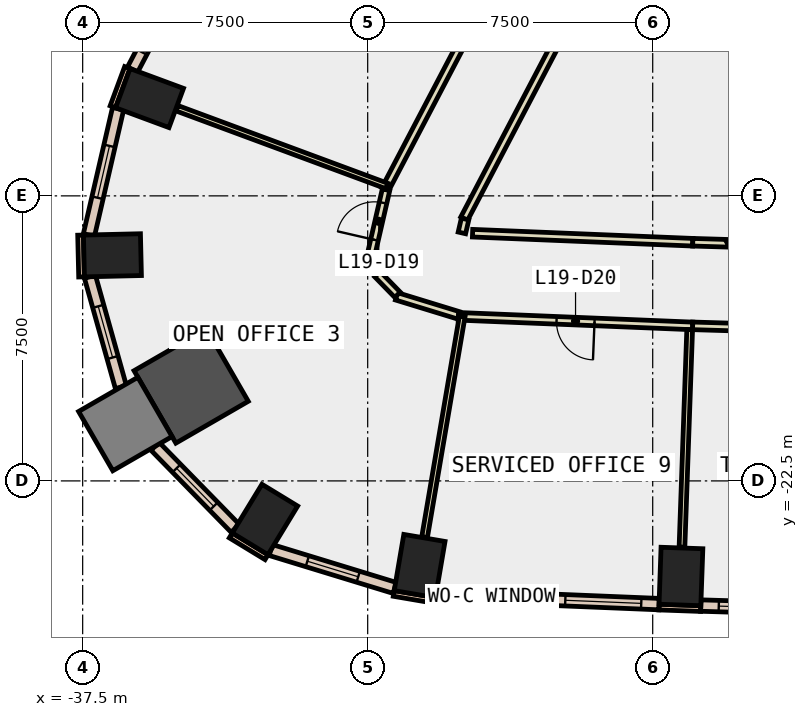
"""IFC4 building model, lengths in metres.
Left out: names, types, materials, properties, quantities, classifications, styles, units other than length and angle.
Written with IfcOpenShell. Run it as: python <this file> out.ifc"""

import sys

from ifc_helpers import new_model, si_unit, direction, frame, frame_2d, origin, origin_2d, place, context, subcontext, project, spatial, rectangle, extrude, element, fill, save


model = new_model("IFC4")
c1 = context("Model", 3, precision=1e-05, world=origin(), true_north=direction((0.0, 1.0)))
c2 = subcontext(c1, "Body", "Model", "MODEL_VIEW")
j1 = project(units=[si_unit("LENGTHUNIT", "METRE"), si_unit("PLANEANGLEUNIT", "RADIAN")], contexts=[c1])
p1 = place(None, origin())
s1 = spatial("IfcSite", under=j1, at=p1, CompositionType="ELEMENT")
p2 = place(p1, origin())
s2 = spatial("IfcBuilding", under=s1, at=p2, CompositionType="ELEMENT")
p3 = place(p2, frame((0.0, 0.0, 90.8)))
s3 = spatial("IfcBuildingStorey", under=s2, at=p3, CompositionType="ELEMENT", Elevation=90.8)
for number, where, z_axis, x_axis in (
    (1, (-28.633, -24.74, -0.4), (0.0, 0.0, 1.0), (-0.986, 0.168, 0.0)),
    (2, (-21.757, -25.015, -0.4), (0.0, 0.0, 1.0), (-0.999, 0.035, 0.0)),
    (3, (-35.741, -12.427, -0.4), (0.0, 0.0, 1.0), (0.347, 0.938, 0.0)),
    (4, (-36.717, -16.564, -0.4), (0.0, 0.0, 1.0), (-0.023, 1.0, 0.0)),
):
    element("IfcColumn", number, at=place(p3, frame(where, z_axis=z_axis, x_axis=x_axis)), inside=s3, PredefinedType="COLUMN", context=c2, shape_type="SweptSolid", body=[
        extrude(rectangle(XDim=1.1, YDim=1.5, at=origin_2d()), origin(), (0.0, 0.0, 1.0), 4.2),
    ])
p4 = place(p3, frame((-34.645, -20.003, -0.4), z_axis=(0.0, 0.0, 1.0), x_axis=(0.866025403784, 0.5, 0.0)))
e5 = element("IfcColumn", 5, at=p4, inside=s3, PredefinedType="COLUMN", context=c2, shape_type="SweptSolid", body=[
    extrude(rectangle(XDim=2.2, YDim=2.2, at=origin_2d()), origin(), (0.0, 0.0, 1.0), 4.2),
])
p5 = place(p3, frame((-32.703, -23.516, -0.4), z_axis=(0.0, 0.0, 1.0), x_axis=(-0.854095929175, 0.520115510024, 0.0)))
e6 = element("IfcColumn", 6, at=p5, inside=s3, PredefinedType="COLUMN", context=c2, shape_type="SweptSolid", body=[
    extrude(rectangle(XDim=1.1, YDim=1.5, at=origin_2d()), origin(), (0.0, 0.0, 1.0), 4.2),
])
p6 = place(p3, frame((-36.377, -21.003, -0.4), z_axis=(0.0, 0.0, 1.0), x_axis=(0.866025403784, 0.5, 0.0)))
e7 = element("IfcColumn", 7, at=p6, inside=s3, PredefinedType="COLUMN", context=c2, shape_type="SweptSolid", body=[
    extrude(rectangle(XDim=1.8, YDim=1.8, at=origin_2d()), origin(), (0.0, 0.0, 1.0), 4.2),
])
p7 = place(p3, frame((-36.324, -11.624, 0.0), z_axis=(0.0, 0.0, 1.0), x_axis=(-0.347205967468, -0.937788897436, 0.0)))
e8 = element("IfcWall", 8, at=p7, inside=s3, PredefinedType="STANDARD", context=c2, shape_type="SweptSolid", body=[
    extrude(rectangle(XDim=1.1, YDim=0.15, at=frame_2d((0.55, 0.0))), origin(), (0.0, 0.0, 1.0), 3.8),
])
p8 = place(p3, frame((-29.314, -25.461, 0.0), z_axis=(0.0, 0.0, 1.0), x_axis=(0.985763338892, -0.168138751323, 0.0)))
e9 = element("IfcWall", 9, at=p8, inside=s3, PredefinedType="STANDARD", context=c2, shape_type="SweptSolid", body=[
    extrude(rectangle(XDim=1.101, YDim=0.15, at=frame_2d((0.55, 0.0))), origin(), (0.0, 0.0, 1.0), 3.8),
])
p9 = place(p3, frame((-22.336, -25.82, 0.0), z_axis=(0.0, 0.0, 1.0), x_axis=(0.999376638472, -0.035303462679, 0.0)))
e10 = element("IfcWall", 10, at=p9, inside=s3, PredefinedType="STANDARD", context=c2, shape_type="SweptSolid", body=[
    extrude(rectangle(XDim=1.1, YDim=0.15, at=frame_2d((0.55, 0.0))), origin(), (0.0, 0.0, 1.0), 3.8),
])
for number, where, z_axis, x_axis in (
    (11, (-37.555, -16.033, 0.0), (0.0, 0.0, 1.0), (0.024, -1.0, 0.0)),
    (12, (-33.602, -23.935, 0.0), (0.0, 0.0, 1.0), (0.854, -0.52, 0.0)),
):
    element("IfcWall", number, at=place(p3, frame(where, z_axis=z_axis, x_axis=x_axis)), inside=s3, PredefinedType="STANDARD", context=c2, shape_type="SweptSolid", body=[
        extrude(rectangle(XDim=1.1, YDim=0.15, at=frame_2d((0.55, 0.0))), origin(), (0.0, 0.0, 1.0), 3.8),
    ])
p10 = place(p3, frame((-28.205, -25.501, 0.0), z_axis=(0.0, 0.0, 1.0), x_axis=(0.999159360905, -0.040994774244, 0.0)))
e13 = element("IfcWall", 13, at=p10, inside=s3, PredefinedType="STANDARD", context=c2, shape_type="SweptSolid", body=[
    extrude(rectangle(XDim=5.878, YDim=0.3, at=frame_2d((2.939, 0.0))), origin(), (0.0, 0.0, 1.0), 3.8),
])
p11 = place(p10, frame((0.469, 0.0, 0.9)))
e14 = element("IfcOpeningElement", 14, at=p11, cuts=e13, PredefinedType="OPENING", context=c2, shape_type="SweptSolid", body=[
    extrude(rectangle(XDim=2.0, YDim=2.6, at=frame_2d((1.0, 1.3))), frame((0.0, 0.16, 0.0), z_axis=(0.0, -1.0, 0.0), x_axis=(1.0, 0.0, 0.0)), (0.0, 0.0, 1.0), 0.32),
])
p12 = place(p10, frame((3.408, 0.0, 0.9)))
e15 = element("IfcOpeningElement", 15, at=p12, cuts=e13, PredefinedType="OPENING", context=c2, shape_type="SweptSolid", body=[
    extrude(rectangle(XDim=2.0, YDim=2.6, at=frame_2d((1.0, 1.3))), frame((0.0, 0.16, 0.0), z_axis=(0.0, -1.0, 0.0), x_axis=(1.0, 0.0, 0.0)), (0.0, 0.0, 1.0), 0.32),
])
p13 = place(p3, frame((-21.235, -25.78, 0.0), z_axis=(0.0, 0.0, 1.0), x_axis=(0.999554487555, -0.029846715213, 0.0)))
e16 = element("IfcWall", 16, at=p13, inside=s3, PredefinedType="STANDARD", context=c2, shape_type="SweptSolid", body=[
    extrude(rectangle(XDim=5.898, YDim=0.3, at=frame_2d((2.949, 0.0))), origin(), (0.0, 0.0, 1.0), 3.8),
])
p14 = place(p13, frame((0.474, 0.0, 0.9)))
e17 = element("IfcOpeningElement", 17, at=p14, cuts=e16, PredefinedType="OPENING", context=c2, shape_type="SweptSolid", body=[
    extrude(rectangle(XDim=2.0, YDim=2.6, at=frame_2d((1.0, 1.3))), frame((0.0, 0.16, 0.0), z_axis=(0.0, -1.0, 0.0), x_axis=(1.0, 0.0, 0.0)), (0.0, 0.0, 1.0), 0.32),
])
p15 = place(p13, frame((3.423, 0.0, 0.9)))
e18 = element("IfcOpeningElement", 18, at=p15, cuts=e16, PredefinedType="OPENING", context=c2, shape_type="SweptSolid", body=[
    extrude(rectangle(XDim=2.0, YDim=2.6, at=frame_2d((1.0, 1.3))), frame((0.0, 0.16, 0.0), z_axis=(0.0, -1.0, 0.0), x_axis=(1.0, 0.0, 0.0)), (0.0, 0.0, 1.0), 0.32),
])
p16 = place(p3, frame((-33.366, -6.295, 0.0), z_axis=(0.0, 0.0, 1.0), x_axis=(-0.464187178015, -0.885737130173, 0.0)))
e19 = element("IfcWall", 19, at=p16, inside=s3, PredefinedType="STANDARD", context=c2, shape_type="SweptSolid", body=[
    extrude(rectangle(XDim=6.075, YDim=0.3, at=frame_2d((3.038, 0.0))), origin(), (0.0, 0.0, 1.0), 3.8),
])
p17 = place(p16, frame((0.519, 0.0, 0.9)))
e20 = element("IfcOpeningElement", 20, at=p17, cuts=e19, PredefinedType="OPENING", context=c2, shape_type="SweptSolid", body=[
    extrude(rectangle(XDim=2.0, YDim=2.6, at=frame_2d((1.0, 1.3))), frame((0.0, 0.16, 0.0), z_axis=(0.0, -1.0, 0.0), x_axis=(1.0, 0.0, 0.0)), (0.0, 0.0, 1.0), 0.32),
])
p18 = place(p16, frame((3.556, 0.0, 0.9)))
e21 = element("IfcOpeningElement", 21, at=p18, cuts=e19, PredefinedType="OPENING", context=c2, shape_type="SweptSolid", body=[
    extrude(rectangle(XDim=2.0, YDim=2.6, at=frame_2d((1.0, 1.3))), frame((0.0, 0.16, 0.0), z_axis=(0.0, -1.0, 0.0), x_axis=(1.0, 0.0, 0.0)), (0.0, 0.0, 1.0), 0.32),
])
p19 = place(p3, frame((-36.568, -12.706, 0.0), z_axis=(0.0, 0.0, 1.0), x_axis=(-0.224859506699, -0.974391195695, 0.0)))
e22 = element("IfcWall", 22, at=p19, inside=s3, PredefinedType="STANDARD", context=c2, shape_type="SweptSolid", body=[
    extrude(rectangle(XDim=3.41, YDim=0.3, at=frame_2d((1.705, 0.0))), origin(), (0.0, 0.0, 1.0), 3.8),
])
p20 = place(p19, frame((1.005, 0.0, 0.9)))
e23 = element("IfcOpeningElement", 23, at=p20, cuts=e22, PredefinedType="OPENING", context=c2, shape_type="SweptSolid", body=[
    extrude(rectangle(XDim=1.4, YDim=2.6, at=frame_2d((0.7, 1.3))), frame((0.0, 0.16, 0.0), z_axis=(0.0, -1.0, 0.0), x_axis=(1.0, 0.0, 0.0)), (0.0, 0.0, 1.0), 0.32),
])
p21 = place(p3, frame((-37.309, -17.127, 0.0), z_axis=(0.0, 0.0, 1.0), x_axis=(0.270176120308, -0.962810918102, 0.0)))
e24 = element("IfcWall", 24, at=p21, inside=s3, PredefinedType="STANDARD", context=c2, shape_type="SweptSolid", body=[
    extrude(rectangle(XDim=3.017, YDim=0.3, at=frame_2d((1.509, 0.0))), origin(), (0.0, 0.0, 1.0), 3.8),
])
p22 = place(p21, frame((0.809, 0.0, 0.9)))
e25 = element("IfcOpeningElement", 25, at=p22, cuts=e24, PredefinedType="OPENING", context=c2, shape_type="SweptSolid", body=[
    extrude(rectangle(XDim=1.4, YDim=2.6, at=frame_2d((0.7, 1.3))), frame((0.0, 0.16, 0.0), z_axis=(0.0, -1.0, 0.0), x_axis=(1.0, 0.0, 0.0)), (0.0, 0.0, 1.0), 0.32),
])
p23 = place(p3, frame((-35.595, -21.589, 0.0), z_axis=(0.0, 0.0, 1.0), x_axis=(0.698928244773, -0.715191798512, 0.0)))
e26 = element("IfcWall", 26, at=p23, inside=s3, PredefinedType="STANDARD", context=c2, shape_type="SweptSolid", body=[
    extrude(rectangle(XDim=3.017, YDim=0.3, at=frame_2d((1.509, 0.0))), origin(), (0.0, 0.0, 1.0), 3.8),
])
p24 = place(p23, frame((0.809, 0.0, 0.9)))
e27 = element("IfcOpeningElement", 27, at=p24, cuts=e26, PredefinedType="OPENING", context=c2, shape_type="SweptSolid", body=[
    extrude(rectangle(XDim=1.4, YDim=2.6, at=frame_2d((0.7, 1.3))), frame((0.0, 0.16, 0.0), z_axis=(0.0, -1.0, 0.0), x_axis=(1.0, 0.0, 0.0)), (0.0, 0.0, 1.0), 0.32),
])
p25 = place(p3, frame((-32.549, -24.319, 0.0), z_axis=(0.0, 0.0, 1.0), x_axis=(0.956317661006, -0.292329490895, 0.0)))
e28 = element("IfcWall", 28, at=p25, inside=s3, PredefinedType="STANDARD", context=c2, shape_type="SweptSolid", body=[
    extrude(rectangle(XDim=3.41, YDim=0.3, at=frame_2d((1.705, 0.0))), origin(), (0.0, 0.0, 1.0), 3.8),
])
p26 = place(p25, frame((1.005, 0.0, 0.9)))
e29 = element("IfcOpeningElement", 29, at=p26, cuts=e28, PredefinedType="OPENING", context=c2, shape_type="SweptSolid", body=[
    extrude(rectangle(XDim=1.4, YDim=2.6, at=frame_2d((0.7, 1.3))), frame((0.0, 0.16, 0.0), z_axis=(0.0, -1.0, 0.0), x_axis=(1.0, 0.0, 0.0)), (0.0, 0.0, 1.0), 0.32),
])
p27 = place(p3, frame((-24.678, -10.29, 0.0), z_axis=(0.0, 0.0, 1.0), x_axis=(-0.464203280494, -0.885728691179, 0.0)))
e30 = element("IfcWall", 30, at=p27, inside=s3, PredefinedType="PARTITIONING", context=c2, shape_type="SweptSolid", body=[
    extrude(rectangle(XDim=5.995, YDim=0.2, at=frame_2d((2.998, 0.0))), origin(), (0.0, 0.0, 1.0), 3.8),
])
p28 = place(p3, frame((-27.437, -15.609, 0.0), z_axis=(0.0, 0.0, 1.0), x_axis=(-0.224098195188, -0.97456656977, 0.0)))
e31 = element("IfcWall", 31, at=p28, inside=s3, PredefinedType="PARTITIONING", context=c2, shape_type="SweptSolid", body=[
    extrude(rectangle(XDim=0.375, YDim=0.2, at=frame_2d((0.188, 0.0))), origin(), (0.0, 0.0, 1.0), 3.8),
])
p29 = place(p3, frame((-27.24, -15.982, 0.0), z_axis=(0.0, 0.0, 1.0), x_axis=(0.999157128819, -0.041049140426, 0.0)))
e32 = element("IfcWall", 32, at=p29, inside=s3, PredefinedType="PARTITIONING", context=c2, shape_type="SweptSolid", body=[
    extrude(rectangle(XDim=5.799, YDim=0.2, at=frame_2d((2.899, 0.0))), origin(), (0.0, 0.0, 1.0), 3.8),
])
p30 = place(p3, frame((-21.446, -16.22, 0.0), z_axis=(0.0, 0.0, 1.0), x_axis=(0.999542625536, -0.030241358047, 0.0)))
e33 = element("IfcWall", 33, at=p30, inside=s3, PredefinedType="PARTITIONING", context=c2, shape_type="SweptSolid", body=[
    extrude(rectangle(XDim=0.928, YDim=0.2, at=frame_2d((0.464, 0.0))), origin(), (0.0, 0.0, 1.0), 3.8),
])
p31 = place(p3, frame((-29.541, -14.829, 0.0), z_axis=(0.0, 0.0, 1.0), x_axis=(0.46422598759, 0.885716790202, 0.0)))
e34 = element("IfcWall", 34, at=p31, inside=s3, PredefinedType="PARTITIONING", context=c2, shape_type="SweptSolid", body=[
    extrude(rectangle(XDim=6.29, YDim=0.2, at=frame_2d((3.145, 0.0))), origin(), (0.0, 0.0, 1.0), 3.8),
])
p32 = place(p3, frame((-27.608, -18.144, 0.0), z_axis=(0.0, 0.0, 1.0), x_axis=(-0.956137025409, 0.292919764852, 0.0)))
e35 = element("IfcWall", 35, at=p32, inside=s3, PredefinedType="PARTITIONING", context=c2, shape_type="SweptSolid", body=[
    extrude(rectangle(XDim=1.707, YDim=0.2, at=frame_2d((0.854, 0.0))), origin(), (0.0, 0.0, 1.0), 3.8),
])
p33 = place(p3, frame((-29.215, -17.602, 0.0), z_axis=(0.0, 0.0, 1.0), x_axis=(-0.698331924638, 0.715774072617, 0.0)))
e36 = element("IfcWall", 36, at=p33, inside=s3, PredefinedType="PARTITIONING", context=c2, shape_type="SweptSolid", body=[
    extrude(rectangle(XDim=0.756, YDim=0.2, at=frame_2d((0.378, 0.0))), origin(), (0.0, 0.0, 1.0), 3.8),
])
p34 = place(p3, frame((-29.701, -17.036, 0.0), z_axis=(0.0, 0.0, 1.0), x_axis=(-0.269792639482, 0.962918444979, 0.0)))
e37 = element("IfcWall", 37, at=p34, inside=s3, PredefinedType="PARTITIONING", context=c2, shape_type="SweptSolid", body=[
    extrude(rectangle(XDim=0.557, YDim=0.2, at=frame_2d((0.278, 0.0))), origin(), (0.0, 0.0, 1.0), 3.8),
])
p35 = place(p3, frame((-29.9, -16.501, 0.0), z_axis=(0.0, 0.0, 1.0), x_axis=(0.224316169854, 0.974516421587, 0.0)))
e38 = element("IfcWall", 38, at=p35, inside=s3, PredefinedType="PARTITIONING", context=c2, shape_type="SweptSolid", body=[
    extrude(rectangle(XDim=1.707, YDim=0.2, at=frame_2d((0.853, 0.0))), origin(), (0.0, 0.0, 1.0), 3.8),
])
p36 = place(p35, frame((0.353, 0.0, 0.0)))
e39 = element("IfcOpeningElement", 39, at=p36, cuts=e38, PredefinedType="OPENING", context=c2, shape_type="SweptSolid", body=[
    extrude(rectangle(XDim=1.0, YDim=2.1, at=frame_2d((0.5, 1.05))), frame((0.0, 0.11, 0.0), z_axis=(0.0, -1.0, 0.0), x_axis=(1.0, 0.0, 0.0)), (0.0, 0.0, 1.0), 0.22),
])
p37 = place(p3, frame((-21.449, -18.422, 0.0), z_axis=(0.0, 0.0, 1.0), x_axis=(-0.999157588083, 0.041037960189, 0.0)))
e40 = element("IfcWall", 40, at=p37, inside=s3, PredefinedType="PARTITIONING", context=c2, shape_type="SweptSolid", body=[
    extrude(rectangle(XDim=6.169, YDim=0.2, at=frame_2d((3.084, 0.0))), origin(), (0.0, 0.0, 1.0), 3.8),
])
p38 = place(p37, frame((2.584, 0.0, 0.0)))
e41 = element("IfcOpeningElement", 41, at=p38, cuts=e40, PredefinedType="OPENING", context=c2, shape_type="SweptSolid", body=[
    extrude(rectangle(XDim=1.0, YDim=2.1, at=frame_2d((0.5, 1.05))), frame((0.0, 0.11, 0.0), z_axis=(0.0, -1.0, 0.0), x_axis=(1.0, 0.0, 0.0)), (0.0, 0.0, 1.0), 0.22),
])
p39 = place(p3, frame((-14.539, -18.626, 0.0), z_axis=(0.0, 0.0, 1.0), x_axis=(-0.999555675329, 0.029806910574, 0.0)))
e42 = element("IfcWall", 42, at=p39, inside=s3, PredefinedType="PARTITIONING", context=c2, shape_type="SweptSolid", body=[
    extrude(rectangle(XDim=6.913, YDim=0.2, at=frame_2d((3.457, 0.0))), origin(), (0.0, 0.0, 1.0), 3.8),
])
p40 = place(p39, frame((3.031, 0.0, 0.0)))
e43 = element("IfcOpeningElement", 43, at=p40, cuts=e42, PredefinedType="OPENING", context=c2, shape_type="SweptSolid", body=[
    extrude(rectangle(XDim=1.0, YDim=2.1, at=frame_2d((0.5, 1.05))), frame((0.0, 0.11, 0.0), z_axis=(0.0, -1.0, 0.0), x_axis=(1.0, 0.0, 0.0)), (0.0, 0.0, 1.0), 0.22),
])
p41 = place(p3, frame((-13.072, -12.009, 0.0), z_axis=(0.0, 0.0, 1.0), x_axis=(-0.865993734772, -0.500054848326, 0.0)))
e44 = element("IfcWall", 44, at=p41, inside=s3, PredefinedType="PARTITIONING", context=c2, shape_type="SweptSolid", body=[
    extrude(rectangle(XDim=8.583, YDim=0.2, at=frame_2d((4.292, 0.0))), origin(), (0.0, 0.0, 1.0), 3.8),
])
p42 = place(p3, frame((-29.494, -14.741, 0.0), z_axis=(0.0, 0.0, 1.0), x_axis=(-0.937719767819, 0.347392626636, 0.0)))
e45 = element("IfcWall", 45, at=p42, inside=s3, PredefinedType="PARTITIONING", context=c2, shape_type="SweptSolid", body=[
    extrude(rectangle(XDim=5.892, YDim=0.15, at=frame_2d((2.946, 0.0))), origin(), (0.0, 0.0, 1.0), 3.8),
])
p43 = place(p3, frame((-27.513, -18.173, 0.0), z_axis=(0.0, 0.0, 1.0), x_axis=(-0.168033262309, -0.985781326034, 0.0)))
e46 = element("IfcWall", 46, at=p43, inside=s3, PredefinedType="PARTITIONING", context=c2, shape_type="SweptSolid", body=[
    extrude(rectangle(XDim=5.892, YDim=0.15, at=frame_2d((2.946, 0.0))), origin(), (0.0, 0.0, 1.0), 3.8),
])
p44 = place(p3, frame((-21.527, -18.519, 0.0), z_axis=(0.0, 0.0, 1.0), x_axis=(-0.035408838092, -0.999372910472, 0.0)))
e47 = element("IfcWall", 47, at=p44, inside=s3, PredefinedType="PARTITIONING", context=c2, shape_type="SweptSolid", body=[
    extrude(rectangle(XDim=5.73, YDim=0.15, at=frame_2d((2.865, 0.0))), origin(), (0.0, 0.0, 1.0), 3.8),
])
p45 = place(p11, origin())
e48 = element("IfcWindow", 48, at=p45, inside=s3, PartitioningType="SINGLE_PANEL", PredefinedType="WINDOW", context=c2, shape_type="SweptSolid", body=[
    extrude(rectangle(XDim=2.0, YDim=2.6, at=frame_2d((1.0, 1.3))), frame((0.0, 0.03, 0.0), z_axis=(0.0, -1.0, 0.0), x_axis=(1.0, 0.0, 0.0)), (0.0, 0.0, 1.0), 0.06),
])
fill(e14, e48)
p46 = place(p12, origin())
e49 = element("IfcWindow", 49, at=p46, inside=s3, PartitioningType="SINGLE_PANEL", PredefinedType="WINDOW", context=c2, shape_type="SweptSolid", body=[
    extrude(rectangle(XDim=2.0, YDim=2.6, at=frame_2d((1.0, 1.3))), frame((0.0, 0.03, 0.0), z_axis=(0.0, -1.0, 0.0), x_axis=(1.0, 0.0, 0.0)), (0.0, 0.0, 1.0), 0.06),
])
fill(e15, e49)
p47 = place(p14, origin())
e50 = element("IfcWindow", 50, at=p47, inside=s3, PartitioningType="SINGLE_PANEL", PredefinedType="WINDOW", context=c2, shape_type="SweptSolid", body=[
    extrude(rectangle(XDim=2.0, YDim=2.6, at=frame_2d((1.0, 1.3))), frame((0.0, 0.03, 0.0), z_axis=(0.0, -1.0, 0.0), x_axis=(1.0, 0.0, 0.0)), (0.0, 0.0, 1.0), 0.06),
])
fill(e17, e50)
p48 = place(p18, origin())
e51 = element("IfcWindow", 51, at=p48, inside=s3, PartitioningType="SINGLE_PANEL", PredefinedType="WINDOW", context=c2, shape_type="SweptSolid", body=[
    extrude(rectangle(XDim=2.0, YDim=2.6, at=frame_2d((1.0, 1.3))), frame((0.0, 0.03, 0.0), z_axis=(0.0, -1.0, 0.0), x_axis=(1.0, 0.0, 0.0)), (0.0, 0.0, 1.0), 0.06),
])
fill(e21, e51)
p49 = place(p20, origin())
e52 = element("IfcWindow", 52, at=p49, inside=s3, PartitioningType="SINGLE_PANEL", PredefinedType="WINDOW", context=c2, shape_type="SweptSolid", body=[
    extrude(rectangle(XDim=1.4, YDim=2.6, at=frame_2d((0.7, 1.3))), frame((0.0, 0.03, 0.0), z_axis=(0.0, -1.0, 0.0), x_axis=(1.0, 0.0, 0.0)), (0.0, 0.0, 1.0), 0.06),
])
fill(e23, e52)
p50 = place(p22, origin())
e53 = element("IfcWindow", 53, at=p50, inside=s3, PartitioningType="SINGLE_PANEL", PredefinedType="WINDOW", context=c2, shape_type="SweptSolid", body=[
    extrude(rectangle(XDim=1.4, YDim=2.6, at=frame_2d((0.7, 1.3))), frame((0.0, 0.03, 0.0), z_axis=(0.0, -1.0, 0.0), x_axis=(1.0, 0.0, 0.0)), (0.0, 0.0, 1.0), 0.06),
])
fill(e25, e53)
p51 = place(p24, origin())
e54 = element("IfcWindow", 54, at=p51, inside=s3, PartitioningType="SINGLE_PANEL", PredefinedType="WINDOW", context=c2, shape_type="SweptSolid", body=[
    extrude(rectangle(XDim=1.4, YDim=2.6, at=frame_2d((0.7, 1.3))), frame((0.0, 0.03, 0.0), z_axis=(0.0, -1.0, 0.0), x_axis=(1.0, 0.0, 0.0)), (0.0, 0.0, 1.0), 0.06),
])
fill(e27, e54)
p52 = place(p26, origin())
e55 = element("IfcWindow", 55, at=p52, inside=s3, PartitioningType="SINGLE_PANEL", PredefinedType="WINDOW", context=c2, shape_type="SweptSolid", body=[
    extrude(rectangle(XDim=1.4, YDim=2.6, at=frame_2d((0.7, 1.3))), frame((0.0, 0.03, 0.0), z_axis=(0.0, -1.0, 0.0), x_axis=(1.0, 0.0, 0.0)), (0.0, 0.0, 1.0), 0.06),
])
fill(e29, e55)
p53 = place(p36, origin())
e56 = element("IfcDoor", 56, at=p53, inside=s3, OperationType="SINGLE_SWING_RIGHT", PredefinedType="DOOR", context=c2, shape_type="SweptSolid", body=[
    extrude(rectangle(XDim=1.0, YDim=2.1, at=frame_2d((0.5, 1.05))), frame((0.0, 0.025, 0.0), z_axis=(0.0, -1.0, 0.0), x_axis=(1.0, 0.0, 0.0)), (0.0, 0.0, 1.0), 0.05),
])
fill(e39, e56)
p54 = place(p38, origin())
e57 = element("IfcDoor", 57, at=p54, inside=s3, OperationType="SINGLE_SWING_LEFT", PredefinedType="DOOR", context=c2, shape_type="SweptSolid", body=[
    extrude(rectangle(XDim=1.0, YDim=2.1, at=frame_2d((0.5, 1.05))), frame((0.0, 0.025, 0.0), z_axis=(0.0, -1.0, 0.0), x_axis=(1.0, 0.0, 0.0)), (0.0, 0.0, 1.0), 0.05),
])
fill(e41, e57)
save(model, sys.argv[1])
